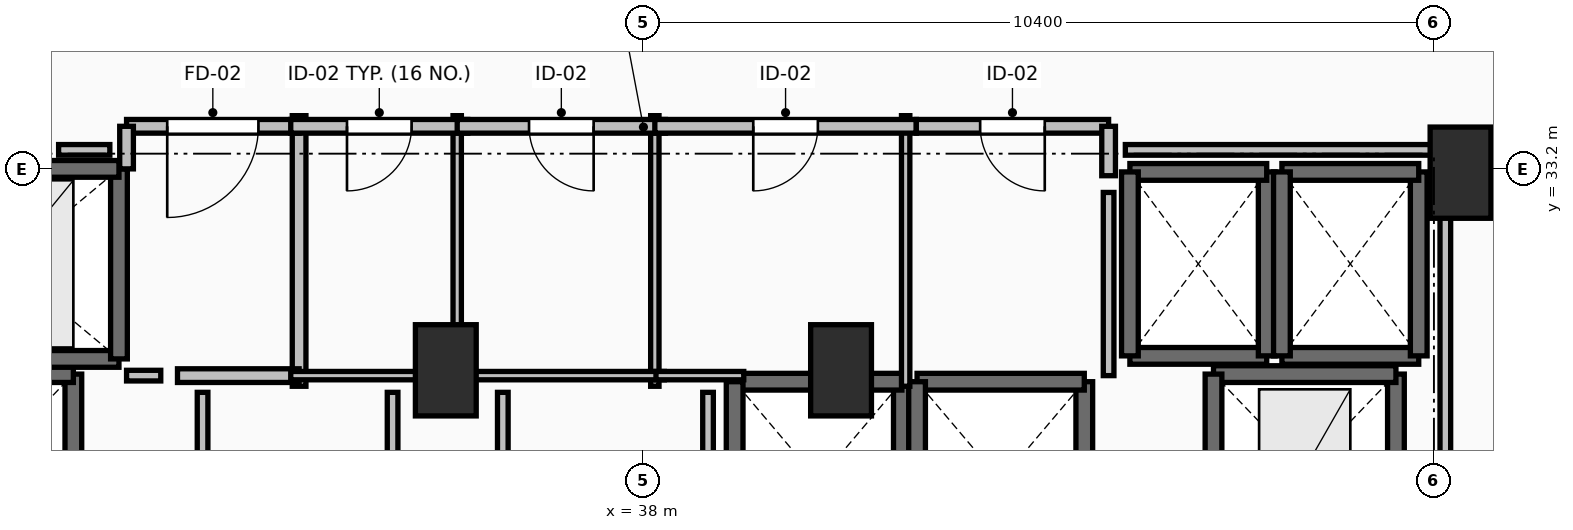
"""IFC4 building model, lengths in metres.
Left out: names, types, materials, properties, quantities, classifications, styles, units other than length and angle.
Written with IfcOpenShell. Run it as: python <this file> out.ifc"""

import sys

from ifc_helpers import new_model, si_unit, direction, frame, frame_2d, origin, origin_2d, place, context, subcontext, project, spatial, rectangle, extrude, element, fill, save


model = new_model("IFC4")
c1 = context("Model", 3, precision=1e-05, world=origin(), true_north=direction((0.0, 1.0)))
c2 = subcontext(c1, "Body", "Model", "MODEL_VIEW")
j1 = project(units=[si_unit("LENGTHUNIT", "METRE"), si_unit("PLANEANGLEUNIT", "RADIAN")], contexts=[c1])
p1 = place(None, origin())
s1 = spatial("IfcSite", under=j1, at=p1, CompositionType="ELEMENT")
p2 = place(p1, origin())
s2 = spatial("IfcBuilding", under=s1, at=p2, CompositionType="ELEMENT")
p3 = place(p2, frame((0.0, 0.0, 129.1)))
s3 = spatial("IfcBuildingStorey", under=s2, at=p3, CompositionType="ELEMENT", Elevation=129.1)
for number, where, z_axis, x_axis in (
    (1, (48.75, 33.15, 0.0), (0.0, 0.0, 1.0), (1.0, 0.0, 0.0)),
    (2, (35.4, 30.55, 0.0), (0.0, 0.0, 1.0), (1.0, 0.0, 0.0)),
    (3, (40.6, 30.55, 0.0), (0.0, 0.0, 1.0), (1.0, 0.0, 0.0)),
):
    element("IfcColumn", number, at=place(p3, frame(where, z_axis=z_axis, x_axis=x_axis)), inside=s3, PredefinedType="PILASTER", context=c2, shape_type="SweptSolid", body=[
        extrude(rectangle(XDim=0.8, YDim=1.2, at=origin_2d()), origin(), (0.0, 0.0, 1.0), 3.5),
    ])
p4 = place(p3, frame((41.4, 27.8, 0.0), z_axis=(0.0, 0.0, 1.0), x_axis=(0.0, 1.0, 0.0)))
e4 = element("IfcWall", 4, at=p4, inside=s3, PredefinedType="SOLIDWALL", context=c2, shape_type="SweptSolid", body=[
    extrude(rectangle(XDim=2.6, YDim=0.22, at=frame_2d((1.3, 0.0))), origin(), (0.0, 0.0, 1.0), 3.24),
])
p5 = place(p3, frame((41.4, 30.4, 0.0), z_axis=(0.0, 0.0, 1.0), x_axis=(-1.0, 0.0, 0.0)))
e5 = element("IfcWall", 5, at=p5, inside=s3, PredefinedType="SOLIDWALL", context=c2, shape_type="SweptSolid", body=[
    extrude(rectangle(XDim=2.2, YDim=0.22, at=frame_2d((1.1, 0.0))), origin(), (0.0, 0.0, 1.0), 3.24),
])
for number, where, z_axis, x_axis in (
    (6, (39.2, 30.4, 0.0), (0.0, 0.0, 1.0), (0.0, -1.0, 0.0)),
    (7, (43.8, 27.8, 0.0), (0.0, 0.0, 1.0), (0.0, 1.0, 0.0)),
):
    element("IfcWall", number, at=place(p3, frame(where, z_axis=z_axis, x_axis=x_axis)), inside=s3, PredefinedType="SOLIDWALL", context=c2, shape_type="SweptSolid", body=[
        extrude(rectangle(XDim=2.6, YDim=0.22, at=frame_2d((1.3, 0.0))), origin(), (0.0, 0.0, 1.0), 3.24),
    ])
p6 = place(p3, frame((43.8, 30.4, 0.0), z_axis=(0.0, 0.0, 1.0), x_axis=(-1.0, 0.0, 0.0)))
e8 = element("IfcWall", 8, at=p6, inside=s3, PredefinedType="SOLIDWALL", context=c2, shape_type="SweptSolid", body=[
    extrude(rectangle(XDim=2.2, YDim=0.22, at=frame_2d((1.1, 0.0))), origin(), (0.0, 0.0, 1.0), 3.24),
])
p7 = place(p3, frame((41.6, 30.4, 0.0), z_axis=(0.0, 0.0, 1.0), x_axis=(0.0, -1.0, 0.0)))
e9 = element("IfcWall", 9, at=p7, inside=s3, PredefinedType="SOLIDWALL", context=c2, shape_type="SweptSolid", body=[
    extrude(rectangle(XDim=2.6, YDim=0.22, at=frame_2d((1.3, 0.0))), origin(), (0.0, 0.0, 1.0), 3.24),
])
p8 = place(p3, frame((44.4, 30.74, 0.0), z_axis=(0.0, 0.0, 1.0), x_axis=(1.0, 0.0, 0.0)))
e10 = element("IfcWall", 10, at=p8, inside=s3, PredefinedType="SOLIDWALL", context=c2, shape_type="SweptSolid", body=[
    extrude(rectangle(XDim=1.8, YDim=0.22, at=frame_2d((0.9, 0.0))), origin(), (0.0, 0.0, 1.0), 3.24),
])
p9 = place(p3, frame((46.2, 30.74, 0.0), z_axis=(0.0, 0.0, 1.0), x_axis=(0.0, 1.0, 0.0)))
e11 = element("IfcWall", 11, at=p9, inside=s3, PredefinedType="SOLIDWALL", context=c2, shape_type="SweptSolid", body=[
    extrude(rectangle(XDim=2.42, YDim=0.22, at=frame_2d((1.21, 0.0))), origin(), (0.0, 0.0, 1.0), 3.24),
])
p10 = place(p3, frame((46.2, 33.16, 0.0), z_axis=(0.0, 0.0, 1.0), x_axis=(-1.0, 0.0, 0.0)))
e12 = element("IfcWall", 12, at=p10, inside=s3, PredefinedType="SOLIDWALL", context=c2, shape_type="SweptSolid", body=[
    extrude(rectangle(XDim=1.8, YDim=0.22, at=frame_2d((0.9, 0.0))), origin(), (0.0, 0.0, 1.0), 3.24),
])
p11 = place(p3, frame((44.4, 33.16, 0.0), z_axis=(0.0, 0.0, 1.0), x_axis=(0.0, -1.0, 0.0)))
e13 = element("IfcWall", 13, at=p11, inside=s3, PredefinedType="SOLIDWALL", context=c2, shape_type="SweptSolid", body=[
    extrude(rectangle(XDim=2.42, YDim=0.22, at=frame_2d((1.21, 0.0))), origin(), (0.0, 0.0, 1.0), 3.24),
])
p12 = place(p3, frame((46.4, 30.74, 0.0), z_axis=(0.0, 0.0, 1.0), x_axis=(1.0, 0.0, 0.0)))
e14 = element("IfcWall", 14, at=p12, inside=s3, PredefinedType="SOLIDWALL", context=c2, shape_type="SweptSolid", body=[
    extrude(rectangle(XDim=1.8, YDim=0.22, at=frame_2d((0.9, 0.0))), origin(), (0.0, 0.0, 1.0), 3.24),
])
p13 = place(p3, frame((48.2, 30.74, 0.0), z_axis=(0.0, 0.0, 1.0), x_axis=(0.0, 1.0, 0.0)))
e15 = element("IfcWall", 15, at=p13, inside=s3, PredefinedType="SOLIDWALL", context=c2, shape_type="SweptSolid", body=[
    extrude(rectangle(XDim=2.42, YDim=0.22, at=frame_2d((1.21, 0.0))), origin(), (0.0, 0.0, 1.0), 3.24),
])
p14 = place(p3, frame((48.2, 33.16, 0.0), z_axis=(0.0, 0.0, 1.0), x_axis=(-1.0, 0.0, 0.0)))
e16 = element("IfcWall", 16, at=p14, inside=s3, PredefinedType="SOLIDWALL", context=c2, shape_type="SweptSolid", body=[
    extrude(rectangle(XDim=1.8, YDim=0.22, at=frame_2d((0.9, 0.0))), origin(), (0.0, 0.0, 1.0), 3.24),
])
p15 = place(p3, frame((46.4, 33.16, 0.0), z_axis=(0.0, 0.0, 1.0), x_axis=(0.0, -1.0, 0.0)))
e17 = element("IfcWall", 17, at=p15, inside=s3, PredefinedType="SOLIDWALL", context=c2, shape_type="SweptSolid", body=[
    extrude(rectangle(XDim=2.42, YDim=0.22, at=frame_2d((1.21, 0.0))), origin(), (0.0, 0.0, 1.0), 3.24),
])
p16 = place(p3, frame((30.5, 28.0, 0.0), z_axis=(0.0, 0.0, 1.0), x_axis=(0.0, 1.0, 0.0)))
e18 = element("IfcWall", 18, at=p16, inside=s3, PredefinedType="SHEAR", context=c2, shape_type="SweptSolid", body=[
    extrude(rectangle(XDim=2.5, YDim=0.22, at=frame_2d((1.25, 0.0))), origin(), (0.0, 0.0, 1.0), 3.24),
])
p17 = place(p3, frame((30.5, 30.5, 0.0), z_axis=(0.0, 0.0, 1.0), x_axis=(-1.0, 0.0, 0.0)))
e19 = element("IfcWall", 19, at=p17, inside=s3, PredefinedType="SHEAR", context=c2, shape_type="SweptSolid", body=[
    extrude(rectangle(XDim=2.4, YDim=0.22, at=frame_2d((1.2, 0.0))), origin(), (0.0, 0.0, 1.0), 3.24),
])
p18 = place(p3, frame((47.9, 28.0, 0.0), z_axis=(0.0, 0.0, 1.0), x_axis=(0.0, 1.0, 0.0)))
e20 = element("IfcWall", 20, at=p18, inside=s3, PredefinedType="SHEAR", context=c2, shape_type="SweptSolid", body=[
    extrude(rectangle(XDim=2.5, YDim=0.22, at=frame_2d((1.25, 0.0))), origin(), (0.0, 0.0, 1.0), 3.24),
])
p19 = place(p3, frame((47.9, 30.5, 0.0), z_axis=(0.0, 0.0, 1.0), x_axis=(-1.0, 0.0, 0.0)))
e21 = element("IfcWall", 21, at=p19, inside=s3, PredefinedType="SHEAR", context=c2, shape_type="SweptSolid", body=[
    extrude(rectangle(XDim=2.4, YDim=0.22, at=frame_2d((1.2, 0.0))), origin(), (0.0, 0.0, 1.0), 3.24),
])
p20 = place(p3, frame((45.5, 30.5, 0.0), z_axis=(0.0, 0.0, 1.0), x_axis=(0.0, -1.0, 0.0)))
e22 = element("IfcWall", 22, at=p20, inside=s3, PredefinedType="SHEAR", context=c2, shape_type="SweptSolid", body=[
    extrude(rectangle(XDim=2.5, YDim=0.22, at=frame_2d((1.25, 0.0))), origin(), (0.0, 0.0, 1.0), 3.24),
])
p21 = place(p3, frame((28.1, 30.7, 0.0), z_axis=(0.0, 0.0, 1.0), x_axis=(1.0, 0.0, 0.0)))
e23 = element("IfcWall", 23, at=p21, inside=s3, PredefinedType="SOLIDWALL", context=c2, shape_type="SweptSolid", body=[
    extrude(rectangle(XDim=3.0, YDim=0.22, at=frame_2d((1.5, 0.0))), origin(), (0.0, 0.0, 1.0), 3.24),
])
p22 = place(p3, frame((31.1, 30.7, 0.0), z_axis=(0.0, 0.0, 1.0), x_axis=(0.0, 1.0, 0.0)))
e24 = element("IfcWall", 24, at=p22, inside=s3, PredefinedType="SOLIDWALL", context=c2, shape_type="SweptSolid", body=[
    extrude(rectangle(XDim=2.5, YDim=0.22, at=frame_2d((1.25, 0.0))), origin(), (0.0, 0.0, 1.0), 3.24),
])
p23 = place(p3, frame((31.1, 33.2, 0.0), z_axis=(0.0, 0.0, 1.0), x_axis=(-1.0, 0.0, 0.0)))
e25 = element("IfcWall", 25, at=p23, inside=s3, PredefinedType="SOLIDWALL", context=c2, shape_type="SweptSolid", body=[
    extrude(rectangle(XDim=3.0, YDim=0.22, at=frame_2d((1.5, 0.0))), origin(), (0.0, 0.0, 1.0), 3.24),
])
p24 = place(p23, frame((0.9, 0.0, 0.0)))
e26 = element("IfcOpeningElement", 26, at=p24, cuts=e25, PredefinedType="OPENING", context=c2, shape_type="SweptSolid", body=[
    extrude(rectangle(XDim=1.2, YDim=2.2, at=frame_2d((0.6, 1.1))), frame((0.0, 0.125, 0.0), z_axis=(0.0, -1.0, 0.0), x_axis=(1.0, 0.0, 0.0)), (0.0, 0.0, 1.0), 0.25),
])
p25 = place(p3, frame((33.47, 30.34, 0.0), z_axis=(0.0, 0.0, 1.0), x_axis=(0.0, 1.0, 0.0)))
e27 = element("IfcWall", 27, at=p25, inside=s3, PredefinedType="PARTITIONING", context=c2, shape_type="SweptSolid", body=[
    extrude(rectangle(XDim=3.56, YDim=0.18, at=frame_2d((1.78, 0.0))), origin(), (0.0, 0.0, 1.0), 3.24),
])
p26 = place(p3, frame((31.87, 30.48, 0.0), z_axis=(0.0, 0.0, 1.0), x_axis=(1.0, 0.0, 0.0)))
e28 = element("IfcWall", 28, at=p26, inside=s3, PredefinedType="PARTITIONING", context=c2, shape_type="SweptSolid", body=[
    extrude(rectangle(XDim=1.6, YDim=0.18, at=frame_2d((0.8, 0.0))), origin(), (0.0, 0.0, 1.0), 3.24),
])
p27 = place(p3, frame((33.47, 33.76, 0.0), z_axis=(0.0, 0.0, 1.0), x_axis=(-1.0, 0.0, 0.0)))
e29 = element("IfcWall", 29, at=p27, inside=s3, PredefinedType="PARTITIONING", context=c2, shape_type="SweptSolid", body=[
    extrude(rectangle(XDim=2.27, YDim=0.18, at=frame_2d((1.135, 0.0))), origin(), (0.0, 0.0, 1.0), 3.24),
])
p28 = place(p27, frame((0.535, 0.0, 0.0)))
e30 = element("IfcOpeningElement", 30, at=p28, cuts=e29, PredefinedType="OPENING", context=c2, shape_type="SweptSolid", body=[
    extrude(rectangle(XDim=1.2, YDim=2.15, at=frame_2d((0.6, 1.075))), frame((0.0, 0.105, 0.0), z_axis=(0.0, -1.0, 0.0), x_axis=(1.0, 0.0, 0.0)), (0.0, 0.0, 1.0), 0.21),
])
p29 = place(p3, frame((31.2, 33.76, 0.0), z_axis=(0.0, 0.0, 1.0), x_axis=(0.0, -1.0, 0.0)))
e31 = element("IfcWall", 31, at=p29, inside=s3, PredefinedType="PARTITIONING", context=c2, shape_type="SweptSolid", body=[
    extrude(rectangle(XDim=0.56, YDim=0.18, at=frame_2d((0.28, 0.0))), origin(), (0.0, 0.0, 1.0), 3.24),
])
p30 = place(p3, frame((35.55, 30.34, 0.0), z_axis=(0.0, 0.0, 1.0), x_axis=(0.0, 1.0, 0.0)))
e32 = element("IfcWall", 32, at=p30, inside=s3, PredefinedType="PARTITIONING", context=c2, shape_type="SweptSolid", body=[
    extrude(rectangle(XDim=3.56, YDim=0.11, at=frame_2d((1.78, 0.0))), origin(), (0.0, 0.0, 1.0), 2.432),
])
p31 = place(p3, frame((33.36, 30.48, 0.0), z_axis=(0.0, 0.0, 1.0), x_axis=(1.0, 0.0, 0.0)))
e33 = element("IfcWall", 33, at=p31, inside=s3, PredefinedType="PARTITIONING", context=c2, shape_type="SweptSolid", body=[
    extrude(rectangle(XDim=1.81, YDim=0.11, at=frame_2d((0.905, 0.0))), origin(), (0.0, 0.0, 1.0), 3.24),
])
p32 = place(p3, frame((35.69, 33.76, 0.0), z_axis=(0.0, 0.0, 1.0), x_axis=(-1.0, 0.0, 0.0)))
e34 = element("IfcWall", 34, at=p32, inside=s3, PredefinedType="PARTITIONING", context=c2, shape_type="SweptSolid", body=[
    extrude(rectangle(XDim=2.33, YDim=0.18, at=frame_2d((1.165, 0.0))), origin(), (0.0, 0.0, 1.0), 3.24),
])
p33 = place(p32, frame((0.74, 0.0, 0.0)))
e35 = element("IfcOpeningElement", 35, at=p33, cuts=e34, PredefinedType="OPENING", context=c2, shape_type="SweptSolid", body=[
    extrude(rectangle(XDim=0.85, YDim=2.1, at=frame_2d((0.425, 1.05))), frame((0.0, 0.105, 0.0), z_axis=(0.0, -1.0, 0.0), x_axis=(1.0, 0.0, 0.0)), (0.0, 0.0, 1.0), 0.21),
])
p34 = place(p3, frame((38.15, 30.34, 0.0), z_axis=(0.0, 0.0, 1.0), x_axis=(0.0, 1.0, 0.0)))
e36 = element("IfcWall", 36, at=p34, inside=s3, PredefinedType="PARTITIONING", context=c2, shape_type="SweptSolid", body=[
    extrude(rectangle(XDim=3.56, YDim=0.11, at=frame_2d((1.78, 0.0))), origin(), (0.0, 0.0, 1.0), 2.432),
])
p35 = place(p3, frame((35.68, 30.48, 0.0), z_axis=(0.0, 0.0, 1.0), x_axis=(1.0, 0.0, 0.0)))
e37 = element("IfcWall", 37, at=p35, inside=s3, PredefinedType="PARTITIONING", context=c2, shape_type="SweptSolid", body=[
    extrude(rectangle(XDim=2.595, YDim=0.11, at=frame_2d((1.297, 0.0))), origin(), (0.0, 0.0, 1.0), 2.432),
])
p36 = place(p3, frame((38.29, 33.76, 0.0), z_axis=(0.0, 0.0, 1.0), x_axis=(-1.0, 0.0, 0.0)))
e38 = element("IfcWall", 38, at=p36, inside=s3, PredefinedType="PARTITIONING", context=c2, shape_type="SweptSolid", body=[
    extrude(rectangle(XDim=2.74, YDim=0.18, at=frame_2d((1.37, 0.0))), origin(), (0.0, 0.0, 1.0), 3.24),
])
p37 = place(p36, frame((0.945, 0.0, 0.0)))
e39 = element("IfcOpeningElement", 39, at=p37, cuts=e38, PredefinedType="OPENING", context=c2, shape_type="SweptSolid", body=[
    extrude(rectangle(XDim=0.85, YDim=2.1, at=frame_2d((0.425, 1.05))), frame((0.0, 0.105, 0.0), z_axis=(0.0, -1.0, 0.0), x_axis=(1.0, 0.0, 0.0)), (0.0, 0.0, 1.0), 0.21),
])
p38 = place(p3, frame((41.45, 30.34, 0.0), z_axis=(0.0, 0.0, 1.0), x_axis=(0.0, 1.0, 0.0)))
e40 = element("IfcWall", 40, at=p38, inside=s3, PredefinedType="PARTITIONING", context=c2, shape_type="SweptSolid", body=[
    extrude(rectangle(XDim=3.56, YDim=0.11, at=frame_2d((1.78, 0.0))), origin(), (0.0, 0.0, 1.0), 3.24),
])
p39 = place(p3, frame((38.165, 30.48, 0.0), z_axis=(0.0, 0.0, 1.0), x_axis=(1.0, 0.0, 0.0)))
e41 = element("IfcWall", 41, at=p39, inside=s3, PredefinedType="PARTITIONING", context=c2, shape_type="SweptSolid", body=[
    extrude(rectangle(XDim=1.155, YDim=0.11, at=frame_2d((0.578, 0.0))), origin(), (0.0, 0.0, 1.0), 2.432),
])
p40 = place(p3, frame((41.59, 33.76, 0.0), z_axis=(0.0, 0.0, 1.0), x_axis=(-1.0, 0.0, 0.0)))
e42 = element("IfcWall", 42, at=p40, inside=s3, PredefinedType="PARTITIONING", context=c2, shape_type="SweptSolid", body=[
    extrude(rectangle(XDim=3.44, YDim=0.18, at=frame_2d((1.72, 0.0))), origin(), (0.0, 0.0, 1.0), 3.24),
])
p41 = place(p40, frame((1.295, 0.0, 0.0)))
e43 = element("IfcOpeningElement", 43, at=p41, cuts=e42, PredefinedType="OPENING", context=c2, shape_type="SweptSolid", body=[
    extrude(rectangle(XDim=0.85, YDim=2.1, at=frame_2d((0.425, 1.05))), frame((0.0, 0.105, 0.0), z_axis=(0.0, -1.0, 0.0), x_axis=(1.0, 0.0, 0.0)), (0.0, 0.0, 1.0), 0.21),
])
p42 = place(p3, frame((44.12, 33.76, 0.0), z_axis=(0.0, 0.0, 1.0), x_axis=(-1.0, 0.0, 0.0)))
e44 = element("IfcWall", 44, at=p42, inside=s3, PredefinedType="PARTITIONING", context=c2, shape_type="SweptSolid", body=[
    extrude(rectangle(XDim=2.53, YDim=0.18, at=frame_2d((1.265, 0.0))), origin(), (0.0, 0.0, 1.0), 3.24),
])
p43 = place(p42, frame((0.84, 0.0, 0.0)))
e45 = element("IfcOpeningElement", 45, at=p43, cuts=e44, PredefinedType="OPENING", context=c2, shape_type="SweptSolid", body=[
    extrude(rectangle(XDim=0.85, YDim=2.1, at=frame_2d((0.425, 1.05))), frame((0.0, 0.105, 0.0), z_axis=(0.0, -1.0, 0.0), x_axis=(1.0, 0.0, 0.0)), (0.0, 0.0, 1.0), 0.21),
])
p44 = place(p3, frame((44.12, 33.11, 0.0), z_axis=(0.0, 0.0, 1.0), x_axis=(0.0, 1.0, 0.0)))
e46 = element("IfcWall", 46, at=p44, inside=s3, PredefinedType="PARTITIONING", context=c2, shape_type="SweptSolid", body=[
    extrude(rectangle(XDim=0.65, YDim=0.18, at=frame_2d((0.325, 0.0))), origin(), (0.0, 0.0, 1.0), 3.24),
])
p45 = place(p3, frame((31.2, 30.48, 0.0), z_axis=(0.0, 0.0, 1.0), x_axis=(1.0, 0.0, 0.0)))
e47 = element("IfcWall", 47, at=p45, inside=s3, PredefinedType="PARTITIONING", context=c2, shape_type="SweptSolid", body=[
    extrude(rectangle(XDim=0.45, YDim=0.14, at=frame_2d((0.225, 0.0))), origin(), (0.0, 0.0, 1.0), 3.24),
])
p46 = place(p3, frame((44.12, 30.48, 0.0), z_axis=(0.0, 0.0, 1.0), x_axis=(0.0, 1.0, 0.0)))
e48 = element("IfcWall", 48, at=p46, inside=s3, PredefinedType="PARTITIONING", context=c2, shape_type="SweptSolid", body=[
    extrude(rectangle(XDim=2.41, YDim=0.14, at=frame_2d((1.205, 0.0))), origin(), (0.0, 0.0, 1.0), 3.24),
])
for number, where, z_axis, x_axis in (
    (49, (32.2, 30.26, 0.0), (0.0, 0.0, 1.0), (0.0, -1.0, 0.0)),
    (50, (34.7, 27.87, 0.0), (0.0, 0.0, 1.0), (0.0, 1.0, 0.0)),
    (51, (36.15, 30.26, 0.0), (0.0, 0.0, 1.0), (0.0, -1.0, 0.0)),
    (52, (38.85, 27.87, 0.0), (0.0, 0.0, 1.0), (0.0, 1.0, 0.0)),
):
    element("IfcWall", number, at=place(p3, frame(where, z_axis=z_axis, x_axis=x_axis)), inside=s3, PredefinedType="PARTITIONING", context=c2, shape_type="SweptSolid", body=[
        extrude(rectangle(XDim=2.39, YDim=0.14, at=frame_2d((1.195, 0.0))), origin(), (0.0, 0.0, 1.0), 3.24),
    ])
p47 = place(p3, frame((48.55, 28.196, 0.0), z_axis=(0.0, 0.0, 1.0), x_axis=(0.0, 1.0, 0.0)))
e53 = element("IfcWall", 53, at=p47, inside=s3, PredefinedType="PARTITIONING", context=c2, shape_type="SweptSolid", body=[
    extrude(rectangle(XDim=5.254, YDim=0.14, at=frame_2d((2.627, 0.0))), origin(), (0.0, 0.0, 1.0), 2.432),
])
p48 = place(p3, frame((48.55, 33.45, 0.0), z_axis=(0.0, 0.0, 1.0), x_axis=(-1.0, 0.0, 0.0)))
e54 = element("IfcWall", 54, at=p48, inside=s3, PredefinedType="PARTITIONING", context=c2, shape_type="SweptSolid", body=[
    extrude(rectangle(XDim=4.21, YDim=0.14, at=frame_2d((2.105, 0.0))), origin(), (0.0, 0.0, 1.0), 2.432),
])
p49 = place(p3, frame((30.98, 33.45, 0.0), z_axis=(0.0, 0.0, 1.0), x_axis=(-1.0, 0.0, 0.0)))
e55 = element("IfcWall", 55, at=p49, inside=s3, PredefinedType="PARTITIONING", context=c2, shape_type="SweptSolid", body=[
    extrude(rectangle(XDim=0.674, YDim=0.14, at=frame_2d((0.337, 0.0))), origin(), (0.0, 0.0, 1.0), 3.24),
])
p50 = place(p28, origin())
e56 = element("IfcDoor", 56, at=p50, inside=s3, OperationType="SINGLE_SWING_RIGHT", PredefinedType="DOOR", context=c2, shape_type="SweptSolid", body=[
    extrude(rectangle(XDim=1.2, YDim=2.15, at=frame_2d((0.6, 1.075))), frame((0.0, 0.025, 0.0), z_axis=(0.0, -1.0, 0.0), x_axis=(1.0, 0.0, 0.0)), (0.0, 0.0, 1.0), 0.05),
])
fill(e30, e56)
p51 = place(p33, origin())
e57 = element("IfcDoor", 57, at=p51, inside=s3, OperationType="SINGLE_SWING_RIGHT", PredefinedType="DOOR", context=c2, shape_type="SweptSolid", body=[
    extrude(rectangle(XDim=0.85, YDim=2.1, at=frame_2d((0.425, 1.05))), frame((0.0, 0.025, 0.0), z_axis=(0.0, -1.0, 0.0), x_axis=(1.0, 0.0, 0.0)), (0.0, 0.0, 1.0), 0.05),
])
fill(e35, e57)
p52 = place(p37, origin())
e58 = element("IfcDoor", 58, at=p52, inside=s3, OperationType="SINGLE_SWING_LEFT", PredefinedType="DOOR", context=c2, shape_type="SweptSolid", body=[
    extrude(rectangle(XDim=0.85, YDim=2.1, at=frame_2d((0.425, 1.05))), frame((0.0, 0.025, 0.0), z_axis=(0.0, -1.0, 0.0), x_axis=(1.0, 0.0, 0.0)), (0.0, 0.0, 1.0), 0.05),
])
fill(e39, e58)
p53 = place(p41, origin())
e59 = element("IfcDoor", 59, at=p53, inside=s3, OperationType="SINGLE_SWING_RIGHT", PredefinedType="DOOR", context=c2, shape_type="SweptSolid", body=[
    extrude(rectangle(XDim=0.85, YDim=2.1, at=frame_2d((0.425, 1.05))), frame((0.0, 0.025, 0.0), z_axis=(0.0, -1.0, 0.0), x_axis=(1.0, 0.0, 0.0)), (0.0, 0.0, 1.0), 0.05),
])
fill(e43, e59)
p54 = place(p43, origin())
e60 = element("IfcDoor", 60, at=p54, inside=s3, OperationType="SINGLE_SWING_LEFT", PredefinedType="DOOR", context=c2, shape_type="SweptSolid", body=[
    extrude(rectangle(XDim=0.85, YDim=2.1, at=frame_2d((0.425, 1.05))), frame((0.0, 0.025, 0.0), z_axis=(0.0, -1.0, 0.0), x_axis=(1.0, 0.0, 0.0)), (0.0, 0.0, 1.0), 0.05),
])
fill(e45, e60)
save(model, sys.argv[1])
